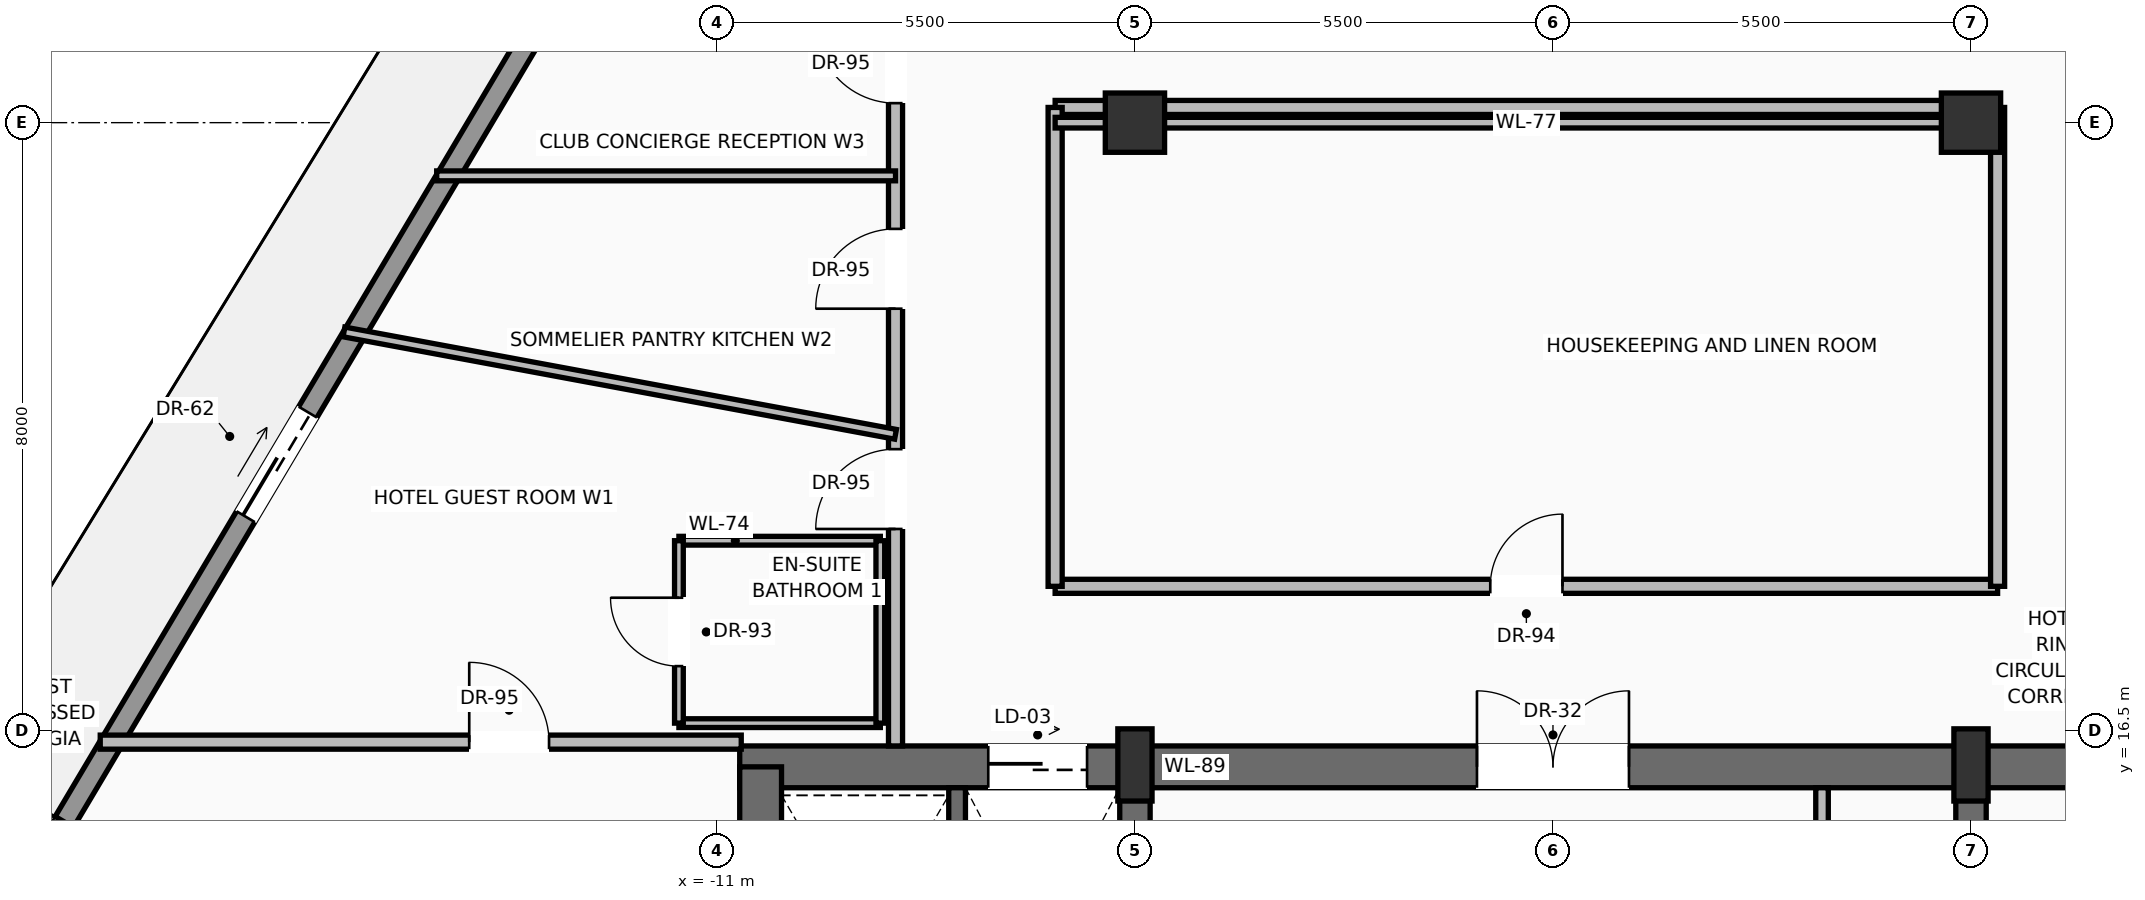
"""IFC4 building model, lengths in metres.
Left out: names, types, materials, properties, quantities, classifications, styles, units other than length and angle.
Written with IfcOpenShell. Run it as: python <this file> out.ifc"""

import sys

from ifc_helpers import new_model, si_unit, direction, frame, frame_2d, origin, origin_2d, place, context, subcontext, project, spatial, rectangle, extrude, source, transform, mapped, element, fill, save


model = new_model("IFC4")
c1 = context("Model", 3, precision=1e-05, world=origin(), true_north=direction((0.0, 1.0)))
c2 = subcontext(c1, "Body", "Model", "MODEL_VIEW")
j1 = project(units=[si_unit("LENGTHUNIT", "METRE"), si_unit("PLANEANGLEUNIT", "RADIAN")], contexts=[c1])
p1 = place(None, origin())
s1 = spatial("IfcSite", under=j1, at=p1, CompositionType="ELEMENT")
p2 = place(p1, origin())
s2 = spatial("IfcBuilding", under=s1, at=p2, CompositionType="ELEMENT")
p3 = place(p2, frame((0.0, 0.0, 230.35)))
s3 = spatial("IfcBuildingStorey", under=s2, at=p3, CompositionType="ELEMENT", Elevation=230.35)
p4 = place(p3, frame((-10.7, 16.025, 0.0), z_axis=(0.0, 0.0, 1.0), x_axis=(1.0, 0.0, 0.0)))
e1 = element("IfcWall", 1, at=p4, inside=s3, PredefinedType="SHEAR", context=c2, shape_type="SweptSolid", body=[
    extrude(rectangle(XDim=21.4, YDim=0.55, at=frame_2d((10.7, 0.0))), origin(), (0.0, 0.0, 1.0), 3.24),
])
p5 = place(p4, frame((3.27, 0.0, 0.0)))
e2 = element("IfcOpeningElement", 2, at=p5, cuts=e1, PredefinedType="OPENING", context=c2, shape_type="SweptSolid", body=[
    extrude(rectangle(XDim=1.3, YDim=2.3, at=frame_2d((0.65, 1.15))), frame((0.0, 0.285, 0.0), z_axis=(0.0, -1.0, 0.0), x_axis=(1.0, 0.0, 0.0)), (0.0, 0.0, 1.0), 0.57),
])
p6 = place(p4, frame((9.7, 0.0, 0.0)))
e3 = element("IfcOpeningElement", 3, at=p6, cuts=e1, PredefinedType="OPENING", context=c2, shape_type="SweptSolid", body=[
    extrude(rectangle(XDim=2.0, YDim=2.4, at=frame_2d((1.0, 1.2))), frame((0.0, 0.285, 0.0), z_axis=(0.0, -1.0, 0.0), x_axis=(1.0, 0.0, 0.0)), (0.0, 0.0, 1.0), 0.57),
])
p7 = place(p3, frame((-10.425, 0.575, 0.0), z_axis=(0.0, 0.0, 1.0), x_axis=(0.0, 1.0, 0.0)))
e4 = element("IfcWall", 4, at=p7, inside=s3, PredefinedType="SHEAR", context=c2, shape_type="SweptSolid", body=[
    extrude(rectangle(XDim=15.45, YDim=0.55, at=frame_2d((7.725, 0.0))), origin(), (0.0, 0.0, 1.0), 3.24),
])
p8 = place(p3, frame((-5.5, 0.575, 0.0), z_axis=(0.0, 0.0, 1.0), x_axis=(0.0, 1.0, 0.0)))
e5 = element("IfcWall", 5, at=p8, inside=s3, PredefinedType="SHEAR", context=c2, shape_type="SweptSolid", body=[
    extrude(rectangle(XDim=15.45, YDim=0.4, at=frame_2d((7.725, 0.0))), origin(), (0.0, 0.0, 1.0), 3.24),
])
p9 = place(p8, frame((8.925, 0.0, 0.0)))
e6 = element("IfcOpeningElement", 6, at=p9, cuts=e5, PredefinedType="OPENING", context=c2, shape_type="SweptSolid", body=[
    extrude(rectangle(XDim=1.1, YDim=2.2, at=frame_2d((0.55, 1.1))), frame((0.0, 0.21, 0.0), z_axis=(0.0, -1.0, 0.0), x_axis=(1.0, 0.0, 0.0)), (0.0, 0.0, 1.0), 0.42),
])
p10 = place(p3, frame((5.5, 0.575, 0.0), z_axis=(0.0, 0.0, 1.0), x_axis=(0.0, 1.0, 0.0)))
e7 = element("IfcWall", 7, at=p10, inside=s3, PredefinedType="SHEAR", context=c2, shape_type="SweptSolid", body=[
    extrude(rectangle(XDim=15.45, YDim=0.4, at=frame_2d((7.725, 0.0))), origin(), (0.0, 0.0, 1.0), 3.24),
])
p11 = place(p10, frame((8.925, 0.0, 0.0)))
e8 = element("IfcOpeningElement", 8, at=p11, cuts=e7, PredefinedType="OPENING", context=c2, shape_type="SweptSolid", body=[
    extrude(rectangle(XDim=1.1, YDim=2.2, at=frame_2d((0.55, 1.1))), frame((0.0, 0.21, 0.0), z_axis=(0.0, -1.0, 0.0), x_axis=(1.0, 0.0, 0.0)), (0.0, 0.0, 1.0), 0.42),
])
m1 = source(origin(), c2, "Body", "SweptSolid", [
    extrude(rectangle(XDim=0.45, YDim=0.95, at=origin_2d()), origin(), (0.0, 0.0, 1.0), 3.45),
])
for number, where, z_axis, x_axis in (
    (9, (-5.5, 16.05, 0.0), (0.0, 0.0, 1.0), (1.0, 0.0, 0.0)),
    (10, (5.5, 16.05, 0.0), (0.0, 0.0, 1.0), (1.0, 0.0, 0.0)),
):
    element("IfcColumn", number, at=place(p3, frame(where, z_axis=z_axis, x_axis=x_axis)), inside=s3, PredefinedType="PILASTER", context=c2, shape_type="MappedRepresentation", body=[
        mapped(m1, transform((0.0, 0.0, 0.0), scale=1.0)),
    ])
m2 = source(origin(), c2, "Body", "SweptSolid", [
    extrude(rectangle(XDim=0.78, YDim=0.78, at=origin_2d()), origin(), (0.0, 0.0, 1.0), 3.45),
])
for number, where, z_axis, x_axis in (
    (11, (-5.5, 24.5, 0.0), (0.0, 0.0, 1.0), (1.0, 0.0, 0.0)),
    (12, (5.5, 24.5, 0.0), (0.0, 0.0, 1.0), (1.0, 0.0, 0.0)),
):
    element("IfcColumn", number, at=place(p3, frame(where, z_axis=z_axis, x_axis=x_axis)), inside=s3, PredefinedType="COLUMN", context=c2, shape_type="MappedRepresentation", body=[
        mapped(m2, transform((0.0, 0.0, 0.0), scale=1.0)),
    ])
p12 = place(p3, frame((-19.586, 15.3, 0.0), z_axis=(0.0, 0.0, 1.0), x_axis=(0.510822157644, 0.859686409838, 0.0)))
e13 = element("IfcWall", 13, at=p12, inside=s3, PredefinedType="SOLIDWALL", context=c2, shape_type="SweptSolid", body=[
    extrude(rectangle(XDim=19.464, YDim=0.28, at=frame_2d((9.732, 0.0))), origin(), (0.0, 0.0, 1.0), 2.82),
])
p13 = place(p12, frame((4.671, 0.0, 0.0)))
e14 = element("IfcOpeningElement", 14, at=p13, cuts=e13, PredefinedType="OPENING", context=c2, shape_type="SweptSolid", body=[
    extrude(rectangle(XDim=1.6, YDim=2.35, at=frame_2d((0.8, 1.175))), frame((0.0, 0.15, 0.0), z_axis=(0.0, -1.0, 0.0), x_axis=(1.0, 0.0, 0.0)), (0.0, 0.0, 1.0), 0.3),
])
p14 = place(p12, frame((13.236, 0.0, 0.9)))
e15 = element("IfcOpeningElement", 15, at=p14, cuts=e13, PredefinedType="OPENING", context=c2, shape_type="SweptSolid", body=[
    extrude(rectangle(XDim=1.55, YDim=1.75, at=frame_2d((0.775, 0.875))), frame((0.0, 0.15, 0.0), z_axis=(0.0, -1.0, 0.0), x_axis=(1.0, 0.0, 0.0)), (0.0, 0.0, 1.0), 0.3),
])
p15 = place(p3, frame((-7.84, 11.87, 0.0), z_axis=(0.0, 0.0, 1.0), x_axis=(0.0, 1.0, 0.0)))
e16 = element("IfcWall", 16, at=p15, inside=s3, PredefinedType="SOLIDWALL", context=c2, shape_type="SweptSolid", body=[
    extrude(rectangle(XDim=3.88, YDim=0.22, at=frame_2d((1.94, 0.0))), origin(), (0.0, 0.0, 1.0), 3.24),
])
p16 = place(p3, frame((3.54, 11.22, 0.0), z_axis=(0.0, 0.0, 1.0), x_axis=(0.0, 1.0, 0.0)))
e17 = element("IfcWall", 17, at=p16, inside=s3, PredefinedType="PARTITIONING", context=c2, shape_type="SweptSolid", body=[
    extrude(rectangle(XDim=4.53, YDim=0.165, at=frame_2d((2.265, 0.0))), origin(), (0.0, 0.0, 1.0), 3.232),
])
p17 = place(p16, frame((1.25, 0.0, 0.0)))
e18 = element("IfcOpeningElement", 18, at=p17, cuts=e17, PredefinedType="OPENING", context=c2, shape_type="SweptSolid", body=[
    extrude(rectangle(XDim=0.9, YDim=2.1, at=frame_2d((0.45, 1.05))), frame((0.0, 0.093, 0.0), z_axis=(0.0, -1.0, 0.0), x_axis=(1.0, 0.0, 0.0)), (0.0, 0.0, 1.0), 0.185),
])
p18 = place(p3, frame((-6.55, 18.4, 0.0), z_axis=(0.0, 0.0, 1.0), x_axis=(1.0, 0.0, 0.0)))
e19 = element("IfcWall", 19, at=p18, inside=s3, PredefinedType="PARTITIONING", context=c2, shape_type="SweptSolid", body=[
    extrude(rectangle(XDim=12.4, YDim=0.185, at=frame_2d((6.2, 0.0))), origin(), (0.0, 0.0, 1.0), 3.232),
])
p19 = place(p18, frame((5.725, 0.0, 0.0)))
e20 = element("IfcOpeningElement", 20, at=p19, cuts=e19, PredefinedType="OPENING", context=c2, shape_type="SweptSolid", body=[
    extrude(rectangle(XDim=0.95, YDim=2.2, at=frame_2d((0.475, 1.1))), frame((0.0, 0.103, 0.0), z_axis=(0.0, -1.0, 0.0), x_axis=(1.0, 0.0, 0.0)), (0.0, 0.0, 1.0), 0.205),
])
p20 = place(p3, frame((-6.55, 24.7, 0.0), z_axis=(0.0, 0.0, 1.0), x_axis=(1.0, 0.0, 0.0)))
e21 = element("IfcWall", 21, at=p20, inside=s3, PredefinedType="PARTITIONING", context=c2, shape_type="SweptSolid", body=[
    extrude(rectangle(XDim=12.4, YDim=0.185, at=frame_2d((6.2, 0.0))), origin(), (0.0, 0.0, 1.0), 2.683),
])
for number, where, z_axis, x_axis in (
    (22, (-6.55, 18.4, 0.0), (0.0, 0.0, 1.0), (0.0, 1.0, 0.0)),
    (23, (5.85, 18.4, 0.0), (0.0, 0.0, 1.0), (0.0, 1.0, 0.0)),
):
    element("IfcWall", number, at=place(p3, frame(where, z_axis=z_axis, x_axis=x_axis)), inside=s3, PredefinedType="PARTITIONING", context=c2, shape_type="SweptSolid", body=[
        extrude(rectangle(XDim=6.3, YDim=0.185, at=frame_2d((3.15, 0.0))), origin(), (0.0, 0.0, 1.0), 3.232),
    ])
p21 = place(p3, frame((-8.65, 16.3, 0.0), z_axis=(0.0, 0.0, 1.0), x_axis=(0.0, 1.0, 0.0)))
e24 = element("IfcWall", 24, at=p21, inside=s3, PredefinedType="PARTITIONING", context=c2, shape_type="SweptSolid", body=[
    extrude(rectangle(XDim=10.5, YDim=0.185, at=frame_2d((5.25, 0.0))), origin(), (0.0, 0.0, 1.0), 3.232),
])
p22 = place(p21, frame((2.854, 0.0, 0.0)))
e25 = element("IfcOpeningElement", 25, at=p22, cuts=e24, PredefinedType="OPENING", context=c2, shape_type="SweptSolid", body=[
    extrude(rectangle(XDim=1.05, YDim=2.25, at=frame_2d((0.525, 1.125))), frame((0.0, 0.103, 0.0), z_axis=(0.0, -1.0, 0.0), x_axis=(1.0, 0.0, 0.0)), (0.0, 0.0, 1.0), 0.205),
])
p23 = place(p21, frame((5.752, 0.0, 0.0)))
e26 = element("IfcOpeningElement", 26, at=p23, cuts=e24, PredefinedType="OPENING", context=c2, shape_type="SweptSolid", body=[
    extrude(rectangle(XDim=1.05, YDim=2.25, at=frame_2d((0.525, 1.125))), frame((0.0, 0.103, 0.0), z_axis=(0.0, -1.0, 0.0), x_axis=(1.0, 0.0, 0.0)), (0.0, 0.0, 1.0), 0.205),
])
p24 = place(p21, frame((8.457, 0.0, 0.0)))
e27 = element("IfcOpeningElement", 27, at=p24, cuts=e24, PredefinedType="OPENING", context=c2, shape_type="SweptSolid", body=[
    extrude(rectangle(XDim=1.05, YDim=2.25, at=frame_2d((0.525, 1.125))), frame((0.0, 0.103, 0.0), z_axis=(0.0, -1.0, 0.0), x_axis=(1.0, 0.0, 0.0)), (0.0, 0.0, 1.0), 0.205),
])
p25 = place(p3, frame((-6.55, 24.5, 0.0), z_axis=(0.0, 0.0, 1.0), x_axis=(1.0, 0.0, 0.0)))
e28 = element("IfcWall", 28, at=p25, inside=s3, PredefinedType="PARTITIONING", context=c2, shape_type="SweptSolid", body=[
    extrude(rectangle(XDim=12.4, YDim=0.14, at=frame_2d((6.2, 0.0))), origin(), (0.0, 0.0, 1.0), 2.683),
])
p26 = place(p3, frame((-19.114, 16.35, 0.0), z_axis=(0.0, 0.0, 1.0), x_axis=(1.0, 0.0, 0.0)))
e29 = element("IfcWall", 29, at=p26, inside=s3, PredefinedType="PARTITIONING", context=c2, shape_type="SweptSolid", body=[
    extrude(rectangle(XDim=8.434, YDim=0.185, at=frame_2d((4.217, 0.0))), origin(), (0.0, 0.0, 1.0), 3.232),
])
p27 = place(p26, frame((4.855, 0.0, 0.0)))
e30 = element("IfcOpeningElement", 30, at=p27, cuts=e29, PredefinedType="OPENING", context=c2, shape_type="SweptSolid", body=[
    extrude(rectangle(XDim=1.05, YDim=2.25, at=frame_2d((0.525, 1.125))), frame((0.0, 0.103, 0.0), z_axis=(0.0, -1.0, 0.0), x_axis=(1.0, 0.0, 0.0)), (0.0, 0.0, 1.0), 0.205),
])
for number, where, z_axis, x_axis in (
    (31, (-11.5, 16.6, 0.0), (0.0, 0.0, 1.0), (1.0, 0.0, 0.0)),
    (32, (-11.5, 19.0, 0.0), (0.0, 0.0, 1.0), (1.0, 0.0, 0.0)),
):
    element("IfcWall", number, at=place(p3, frame(where, z_axis=z_axis, x_axis=x_axis)), inside=s3, PredefinedType="PARTITIONING", context=c2, shape_type="SweptSolid", body=[
        extrude(rectangle(XDim=2.65, YDim=0.115, at=frame_2d((1.325, 0.0))), origin(), (0.0, 0.0, 1.0), 3.232),
    ])
p28 = place(p3, frame((-11.5, 16.6, 0.0), z_axis=(0.0, 0.0, 1.0), x_axis=(0.0, 1.0, 0.0)))
e33 = element("IfcWall", 33, at=p28, inside=s3, PredefinedType="PARTITIONING", context=c2, shape_type="SweptSolid", body=[
    extrude(rectangle(XDim=2.4, YDim=0.115, at=frame_2d((1.2, 0.0))), origin(), (0.0, 0.0, 1.0), 3.232),
])
p29 = place(p28, frame((0.75, 0.0, 0.0)))
e34 = element("IfcOpeningElement", 34, at=p29, cuts=e33, PredefinedType="OPENING", context=c2, shape_type="SweptSolid", body=[
    extrude(rectangle(XDim=0.9, YDim=2.15, at=frame_2d((0.45, 1.075))), frame((0.0, 0.067, 0.0), z_axis=(0.0, -1.0, 0.0), x_axis=(1.0, 0.0, 0.0)), (0.0, 0.0, 1.0), 0.135),
])
p30 = place(p3, frame((-8.85, 16.6, 0.0), z_axis=(0.0, 0.0, 1.0), x_axis=(0.0, 1.0, 0.0)))
e35 = element("IfcWall", 35, at=p30, inside=s3, PredefinedType="PARTITIONING", context=c2, shape_type="SweptSolid", body=[
    extrude(rectangle(XDim=2.4, YDim=0.115, at=frame_2d((1.2, 0.0))), origin(), (0.0, 0.0, 1.0), 3.232),
])
p31 = place(p3, frame((-15.907, 21.747, 0.0), z_axis=(0.0, 0.0, 1.0), x_axis=(0.98321459924, -0.182452875674, 0.0)))
e36 = element("IfcWall", 36, at=p31, inside=s3, PredefinedType="PARTITIONING", context=c2, shape_type="SweptSolid", body=[
    extrude(rectangle(XDim=7.381, YDim=0.13, at=frame_2d((3.69, 0.0))), origin(), (0.0, 0.0, 1.0), 3.232),
])
p32 = place(p3, frame((-14.687, 23.8, 0.0), z_axis=(0.0, 0.0, 1.0), x_axis=(1.0, 0.0, 0.0)))
e37 = element("IfcWall", 37, at=p32, inside=s3, PredefinedType="PARTITIONING", context=c2, shape_type="SweptSolid", body=[
    extrude(rectangle(XDim=6.037, YDim=0.13, at=frame_2d((3.019, 0.0))), origin(), (0.0, 0.0, 1.0), 3.232),
])
m3 = source(origin(), c2, "Body", "SweptSolid", [
    extrude(rectangle(XDim=1.6, YDim=2.35, at=frame_2d((0.8, 1.175))), frame((0.0, 0.025, 0.0), z_axis=(0.0, -1.0, 0.0), x_axis=(1.0, 0.0, 0.0)), (0.0, 0.0, 1.0), 0.05),
])
p33 = place(p13, origin())
e38 = element("IfcDoor", 38, at=p33, inside=s3, OperationType="SLIDING_TO_LEFT", PredefinedType="DOOR", context=c2, shape_type="MappedRepresentation", body=[
    mapped(m3, transform((0.0, 0.0, 0.0), scale=1.0)),
])
fill(e14, e38)
m4 = source(origin(), c2, "Body", "SweptSolid", [
    extrude(rectangle(XDim=1.3, YDim=2.3, at=frame_2d((0.65, 1.15))), frame((0.0, 0.025, 0.0), z_axis=(0.0, -1.0, 0.0), x_axis=(1.0, 0.0, 0.0)), (0.0, 0.0, 1.0), 0.05),
])
p34 = place(p5, origin())
e39 = element("IfcDoor", 39, at=p34, inside=s3, OperationType="SLIDING_TO_RIGHT", PredefinedType="DOOR", context=c2, shape_type="MappedRepresentation", body=[
    mapped(m4, transform((0.0, 0.0, 0.0), scale=1.0)),
])
fill(e2, e39)
m5 = source(origin(), c2, "Body", "SweptSolid", [
    extrude(rectangle(XDim=2.0, YDim=2.4, at=frame_2d((1.0, 1.2))), frame((0.0, 0.025, 0.0), z_axis=(0.0, -1.0, 0.0), x_axis=(1.0, 0.0, 0.0)), (0.0, 0.0, 1.0), 0.05),
])
p35 = place(p6, origin())
e40 = element("IfcDoor", 40, at=p35, inside=s3, OperationType="DOUBLE_DOOR_SINGLE_SWING", PredefinedType="DOOR", context=c2, shape_type="MappedRepresentation", body=[
    mapped(m5, transform((0.0, 0.0, 0.0), scale=1.0)),
])
fill(e3, e40)
m6 = source(origin(), c2, "Body", "SweptSolid", [
    extrude(rectangle(XDim=0.95, YDim=2.2, at=frame_2d((0.475, 1.1))), frame((0.0, 0.025, 0.0), z_axis=(0.0, -1.0, 0.0), x_axis=(1.0, 0.0, 0.0)), (0.0, 0.0, 1.0), 0.05),
])
p36 = place(p19, origin())
e41 = element("IfcDoor", 41, at=p36, inside=s3, OperationType="SINGLE_SWING_RIGHT", PredefinedType="DOOR", context=c2, shape_type="MappedRepresentation", body=[
    mapped(m6, transform((0.0, 0.0, 0.0), scale=1.0)),
])
fill(e20, e41)
m7 = source(origin(), c2, "Body", "SweptSolid", [
    extrude(rectangle(XDim=1.05, YDim=2.25, at=frame_2d((0.525, 1.125))), frame((0.0, 0.025, 0.0), z_axis=(0.0, -1.0, 0.0), x_axis=(1.0, 0.0, 0.0)), (0.0, 0.0, 1.0), 0.05),
])
p37 = place(p27, origin())
e42 = element("IfcDoor", 42, at=p37, inside=s3, OperationType="SINGLE_SWING_LEFT", PredefinedType="DOOR", context=c2, shape_type="MappedRepresentation", body=[
    mapped(m7, transform((0.0, 0.0, 0.0), scale=1.0)),
])
fill(e30, e42)
p38 = place(p22, origin())
e43 = element("IfcDoor", 43, at=p38, inside=s3, OperationType="SINGLE_SWING_LEFT", PredefinedType="DOOR", context=c2, shape_type="MappedRepresentation", body=[
    mapped(m7, transform((0.0, 0.0, 0.0), scale=1.0)),
])
fill(e25, e43)
m8 = source(origin(), c2, "Body", "SweptSolid", [
    extrude(rectangle(XDim=0.9, YDim=2.15, at=frame_2d((0.45, 1.075))), frame((0.0, 0.025, 0.0), z_axis=(0.0, -1.0, 0.0), x_axis=(1.0, 0.0, 0.0)), (0.0, 0.0, 1.0), 0.05),
])
p39 = place(p29, origin())
e44 = element("IfcDoor", 44, at=p39, inside=s3, OperationType="SINGLE_SWING_RIGHT", PredefinedType="DOOR", context=c2, shape_type="MappedRepresentation", body=[
    mapped(m8, transform((0.0, 0.0, 0.0), scale=1.0)),
])
fill(e34, e44)
p40 = place(p23, origin())
e45 = element("IfcDoor", 45, at=p40, inside=s3, OperationType="SINGLE_SWING_LEFT", PredefinedType="DOOR", context=c2, shape_type="MappedRepresentation", body=[
    mapped(m7, transform((0.0, 0.0, 0.0), scale=1.0)),
])
fill(e26, e45)
p41 = place(p24, origin())
e46 = element("IfcDoor", 46, at=p41, inside=s3, OperationType="SINGLE_SWING_RIGHT", PredefinedType="DOOR", context=c2, shape_type="MappedRepresentation", body=[
    mapped(m7, transform((0.0, 0.0, 0.0), scale=1.0)),
])
fill(e27, e46)
save(model, sys.argv[1])
